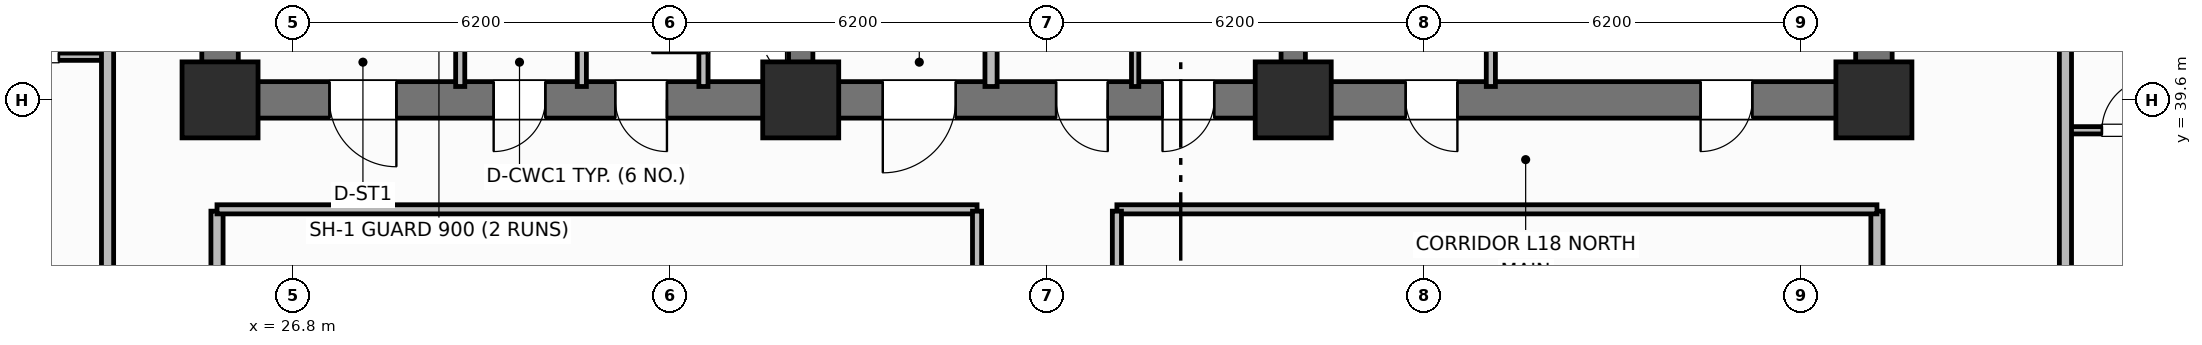
"""IFC4 building model, lengths in metres.
Left out: names, types, materials, properties, quantities, classifications, styles, units other than length and angle.
Written with IfcOpenShell. Run it as: python <this file> out.ifc"""

import sys

from ifc_helpers import new_model, si_unit, direction, frame, frame_2d, origin, origin_2d, place, context, subcontext, project, spatial, rectangle, extrude, element, fill, save


model = new_model("IFC4")
c1 = context("Model", 3, precision=1e-05, world=origin(), true_north=direction((0.0, 1.0)))
c2 = subcontext(c1, "Body", "Model", "MODEL_VIEW")
j1 = project(units=[si_unit("LENGTHUNIT", "METRE"), si_unit("PLANEANGLEUNIT", "RADIAN")], contexts=[c1])
p1 = place(None, origin())
s1 = spatial("IfcSite", under=j1, at=p1, CompositionType="ELEMENT")
p2 = place(p1, origin())
s2 = spatial("IfcBuilding", under=s1, at=p2, CompositionType="ELEMENT")
p3 = place(p2, frame((0.0, 0.0, 73.2)))
s3 = spatial("IfcBuildingStorey", under=s2, at=p3, CompositionType="ELEMENT", Elevation=73.2)
for number, where, z_axis, x_axis in (
    (1, (25.6, 39.9, 0.0), (0.0, 0.0, 1.0), (0.0, 1.0, 0.0)),
    (2, (52.8, 39.9, 0.0), (0.0, 0.0, 1.0), (0.0, 1.0, 0.0)),
):
    element("IfcWall", number, at=place(p3, frame(where, z_axis=z_axis, x_axis=x_axis)), inside=s3, PredefinedType="SHEAR", context=c2, shape_type="SweptSolid", body=[
        extrude(rectangle(XDim=5.6, YDim=0.6, at=frame_2d((2.8, 0.0))), origin(), (0.0, 0.0, 1.0), 3.7),
    ])
p4 = place(p3, frame((52.8, 39.6, 0.0), z_axis=(0.0, 0.0, 1.0), x_axis=(-1.0, 0.0, 0.0)))
e3 = element("IfcWall", 3, at=p4, inside=s3, PredefinedType="SHEAR", context=c2, shape_type="SweptSolid", body=[
    extrude(rectangle(XDim=27.2, YDim=0.6, at=frame_2d((13.6, 0.0))), origin(), (0.0, 0.0, 1.0), 3.7),
])
p5 = place(p4, frame((24.3, 0.0, 0.0)))
e4 = element("IfcOpeningElement", 4, at=p5, cuts=e3, PredefinedType="OPENING", context=c2, shape_type="SweptSolid", body=[
    extrude(rectangle(XDim=1.1, YDim=2.15, at=frame_2d((0.55, 1.075))), frame((0.0, 0.31, 0.0), z_axis=(0.0, -1.0, 0.0), x_axis=(1.0, 0.0, 0.0)), (0.0, 0.0, 1.0), 0.62),
])
p6 = place(p4, frame((21.85, 0.0, 0.0)))
e5 = element("IfcOpeningElement", 5, at=p6, cuts=e3, PredefinedType="OPENING", context=c2, shape_type="SweptSolid", body=[
    extrude(rectangle(XDim=0.85, YDim=2.1, at=frame_2d((0.425, 1.05))), frame((0.0, 0.31, 0.0), z_axis=(0.0, -1.0, 0.0), x_axis=(1.0, 0.0, 0.0)), (0.0, 0.0, 1.0), 0.62),
])
p7 = place(p4, frame((19.85, 0.0, 0.0)))
e6 = element("IfcOpeningElement", 6, at=p7, cuts=e3, PredefinedType="OPENING", context=c2, shape_type="SweptSolid", body=[
    extrude(rectangle(XDim=0.85, YDim=2.1, at=frame_2d((0.425, 1.05))), frame((0.0, 0.31, 0.0), z_axis=(0.0, -1.0, 0.0), x_axis=(1.0, 0.0, 0.0)), (0.0, 0.0, 1.0), 0.62),
])
p8 = place(p4, frame((15.1, 0.0, 0.0)))
e7 = element("IfcOpeningElement", 7, at=p8, cuts=e3, PredefinedType="OPENING", context=c2, shape_type="SweptSolid", body=[
    extrude(rectangle(XDim=1.2, YDim=2.15, at=frame_2d((0.6, 1.075))), frame((0.0, 0.31, 0.0), z_axis=(0.0, -1.0, 0.0), x_axis=(1.0, 0.0, 0.0)), (0.0, 0.0, 1.0), 0.62),
])
p9 = place(p4, frame((12.6, 0.0, 0.0)))
e8 = element("IfcOpeningElement", 8, at=p9, cuts=e3, PredefinedType="OPENING", context=c2, shape_type="SweptSolid", body=[
    extrude(rectangle(XDim=0.85, YDim=2.1, at=frame_2d((0.425, 1.05))), frame((0.0, 0.31, 0.0), z_axis=(0.0, -1.0, 0.0), x_axis=(1.0, 0.0, 0.0)), (0.0, 0.0, 1.0), 0.62),
])
p10 = place(p4, frame((10.85, 0.0, 0.0)))
e9 = element("IfcOpeningElement", 9, at=p10, cuts=e3, PredefinedType="OPENING", context=c2, shape_type="SweptSolid", body=[
    extrude(rectangle(XDim=0.85, YDim=2.1, at=frame_2d((0.425, 1.05))), frame((0.0, 0.31, 0.0), z_axis=(0.0, -1.0, 0.0), x_axis=(1.0, 0.0, 0.0)), (0.0, 0.0, 1.0), 0.62),
])
p11 = place(p4, frame((6.85, 0.0, 0.0)))
e10 = element("IfcOpeningElement", 10, at=p11, cuts=e3, PredefinedType="OPENING", context=c2, shape_type="SweptSolid", body=[
    extrude(rectangle(XDim=0.85, YDim=2.1, at=frame_2d((0.425, 1.05))), frame((0.0, 0.31, 0.0), z_axis=(0.0, -1.0, 0.0), x_axis=(1.0, 0.0, 0.0)), (0.0, 0.0, 1.0), 0.62),
])
p12 = place(p4, frame((2.0, 0.0, 0.0)))
e11 = element("IfcOpeningElement", 11, at=p12, cuts=e3, PredefinedType="OPENING", context=c2, shape_type="SweptSolid", body=[
    extrude(rectangle(XDim=0.85, YDim=2.1, at=frame_2d((0.425, 1.05))), frame((0.0, 0.31, 0.0), z_axis=(0.0, -1.0, 0.0), x_axis=(1.0, 0.0, 0.0)), (0.0, 0.0, 1.0), 0.62),
])
for number, where, z_axis, x_axis in (
    (12, (35.15, 39.9, 0.0), (0.0, 0.0, 1.0), (0.0, 1.0, 0.0)),
    (13, (43.25, 39.9, 0.0), (0.0, 0.0, 1.0), (0.0, 1.0, 0.0)),
):
    element("IfcWall", number, at=place(p3, frame(where, z_axis=z_axis, x_axis=x_axis)), inside=s3, PredefinedType="SHEAR", context=c2, shape_type="SweptSolid", body=[
        extrude(rectangle(XDim=5.6, YDim=0.4, at=frame_2d((2.8, 0.0))), origin(), (0.0, 0.0, 1.0), 3.7),
    ])
for number, where, z_axis, x_axis in (
    (14, (25.6, 39.6, 0.0), (0.0, 0.0, 1.0), (1.0, 0.0, 0.0)),
    (15, (35.15, 39.6, 0.0), (0.0, 0.0, 1.0), (1.0, 0.0, 0.0)),
    (16, (43.25, 39.6, 0.0), (0.0, 0.0, 1.0), (1.0, 0.0, 0.0)),
    (17, (52.8, 39.6, 0.0), (0.0, 0.0, 1.0), (1.0, 0.0, 0.0)),
):
    element("IfcColumn", number, at=place(p3, frame(where, z_axis=z_axis, x_axis=x_axis)), inside=s3, PredefinedType="COLUMN", context=c2, shape_type="SweptSolid", body=[
        extrude(rectangle(XDim=1.25, YDim=1.25, at=origin_2d()), origin(), (0.0, 0.0, 1.0), 3.7),
    ])
p13 = place(p3, frame((33.55, 39.82, 0.0), z_axis=(0.0, 0.0, 1.0), x_axis=(0.0, 1.0, 0.0)))
e18 = element("IfcWall", 18, at=p13, inside=s3, PredefinedType="PARTITIONING", context=c2, shape_type="SweptSolid", body=[
    extrude(rectangle(XDim=2.13, YDim=0.15, at=frame_2d((1.065, 0.0))), origin(), (0.0, 0.0, 1.0), 2.49),
])
p14 = place(p13, frame((0.55, 0.0, 0.0)))
e19 = element("IfcOpeningElement", 19, at=p14, cuts=e18, PredefinedType="OPENING", context=c2, shape_type="SweptSolid", body=[
    extrude(rectangle(XDim=0.85, YDim=2.05, at=frame_2d((0.425, 1.025))), frame((0.0, 0.085, 0.0), z_axis=(0.0, -1.0, 0.0), x_axis=(1.0, 0.0, 0.0)), (0.0, 0.0, 1.0), 0.17),
])
for number, where, z_axis, x_axis in (
    (20, (29.55, 39.82, 0.0), (0.0, 0.0, 1.0), (0.0, 1.0, 0.0)),
    (21, (31.55, 39.82, 0.0), (0.0, 0.0, 1.0), (0.0, 1.0, 0.0)),
):
    element("IfcWall", number, at=place(p3, frame(where, z_axis=z_axis, x_axis=x_axis)), inside=s3, PredefinedType="PARTITIONING", context=c2, shape_type="SweptSolid", body=[
        extrude(rectangle(XDim=2.13, YDim=0.15, at=frame_2d((1.065, 0.0))), origin(), (0.0, 0.0, 1.0), 2.49),
    ])
p15 = place(p3, frame((38.28, 39.82, 0.0), z_axis=(0.0, 0.0, 1.0), x_axis=(0.0, 1.0, 0.0)))
e22 = element("IfcWall", 22, at=p15, inside=s3, PredefinedType="PARTITIONING", context=c2, shape_type="SweptSolid", body=[
    extrude(rectangle(XDim=2.73, YDim=0.2, at=frame_2d((1.365, 0.0))), origin(), (0.0, 0.0, 1.0), 2.49),
])
p16 = place(p3, frame((40.65, 39.82, 0.0), z_axis=(0.0, 0.0, 1.0), x_axis=(0.0, 1.0, 0.0)))
e23 = element("IfcWall", 23, at=p16, inside=s3, PredefinedType="PARTITIONING", context=c2, shape_type="SweptSolid", body=[
    extrude(rectangle(XDim=2.73, YDim=0.12, at=frame_2d((1.365, 0.0))), origin(), (0.0, 0.0, 1.0), 2.49),
])
p17 = place(p3, frame((46.5, 39.82, 0.0), z_axis=(0.0, 0.0, 1.0), x_axis=(0.0, 1.0, 0.0)))
e24 = element("IfcWall", 24, at=p17, inside=s3, PredefinedType="PARTITIONING", context=c2, shape_type="SweptSolid", body=[
    extrude(rectangle(XDim=2.73, YDim=0.15, at=frame_2d((1.365, 0.0))), origin(), (0.0, 0.0, 1.0), 2.49),
])
for number, where, z_axis, x_axis in (
    (25, (25.55, 18.63, 0.0), (0.0, 0.0, 1.0), (0.0, 1.0, 0.0)),
    (26, (52.85, 18.63, 0.0), (0.0, 0.0, 1.0), (0.0, 1.0, 0.0)),
):
    element("IfcWall", number, at=place(p3, frame(where, z_axis=z_axis, x_axis=x_axis)), inside=s3, PredefinedType="PARTITIONING", context=c2, shape_type="SweptSolid", body=[
        extrude(rectangle(XDim=19.14, YDim=0.2, at=frame_2d((9.57, 0.0))), origin(), (0.0, 0.0, 1.0), 2.49),
    ])
for number, where, z_axis, x_axis in (
    (27, (25.55, 37.8, 0.0), (0.0, 0.0, 1.0), (1.0, 0.0, 0.0)),
    (28, (40.35, 37.8, 0.0), (0.0, 0.0, 1.0), (1.0, 0.0, 0.0)),
):
    element("IfcWall", number, at=place(p3, frame(where, z_axis=z_axis, x_axis=x_axis)), inside=s3, PredefinedType="PARTITIONING", context=c2, shape_type="SweptSolid", body=[
        extrude(rectangle(XDim=12.5, YDim=0.15, at=frame_2d((6.25, 0.0))), origin(), (0.0, 0.0, 1.0), 2.49),
    ])
p18 = place(p3, frame((38.05, 18.63, 0.0), z_axis=(0.0, 0.0, 1.0), x_axis=(0.0, 1.0, 0.0)))
e29 = element("IfcWall", 29, at=p18, inside=s3, PredefinedType="PARTITIONING", context=c2, shape_type="SweptSolid", body=[
    extrude(rectangle(XDim=19.14, YDim=0.15, at=frame_2d((9.57, 0.0))), origin(), (0.0, 0.0, 1.0), 2.49),
])
p19 = place(p18, frame((2.2, 0.0, 0.0)))
e30 = element("IfcOpeningElement", 30, at=p19, cuts=e29, PredefinedType="OPENING", context=c2, shape_type="SweptSolid", body=[
    extrude(rectangle(XDim=1.0, YDim=2.15, at=frame_2d((0.5, 1.075))), frame((0.0, 0.085, 0.0), z_axis=(0.0, -1.0, 0.0), x_axis=(1.0, 0.0, 0.0)), (0.0, 0.0, 1.0), 0.17),
])
p20 = place(p18, frame((12.518, 0.0, 0.0)))
e31 = element("IfcOpeningElement", 31, at=p20, cuts=e29, PredefinedType="OPENING", context=c2, shape_type="SweptSolid", body=[
    extrude(rectangle(XDim=1.0, YDim=2.15, at=frame_2d((0.5, 1.075))), frame((0.0, 0.085, 0.0), z_axis=(0.0, -1.0, 0.0), x_axis=(1.0, 0.0, 0.0)), (0.0, 0.0, 1.0), 0.17),
])
p21 = place(p3, frame((40.35, 18.63, 0.0), z_axis=(0.0, 0.0, 1.0), x_axis=(0.0, 1.0, 0.0)))
e32 = element("IfcWall", 32, at=p21, inside=s3, PredefinedType="PARTITIONING", context=c2, shape_type="SweptSolid", body=[
    extrude(rectangle(XDim=19.14, YDim=0.15, at=frame_2d((9.57, 0.0))), origin(), (0.0, 0.0, 1.0), 2.49),
])
p22 = place(p21, frame((2.2, 0.0, 0.0)))
e33 = element("IfcOpeningElement", 33, at=p22, cuts=e32, PredefinedType="OPENING", context=c2, shape_type="SweptSolid", body=[
    extrude(rectangle(XDim=1.0, YDim=2.15, at=frame_2d((0.5, 1.075))), frame((0.0, 0.085, 0.0), z_axis=(0.0, -1.0, 0.0), x_axis=(1.0, 0.0, 0.0)), (0.0, 0.0, 1.0), 0.17),
])
p23 = place(p21, frame((12.518, 0.0, 0.0)))
e34 = element("IfcOpeningElement", 34, at=p23, cuts=e32, PredefinedType="OPENING", context=c2, shape_type="SweptSolid", body=[
    extrude(rectangle(XDim=0.9, YDim=2.1, at=frame_2d((0.45, 1.05))), frame((0.0, 0.085, 0.0), z_axis=(0.0, -1.0, 0.0), x_axis=(1.0, 0.0, 0.0)), (0.0, 0.0, 1.0), 0.17),
])
p24 = place(p3, frame((21.5, 40.31, 0.0), z_axis=(0.0, 0.0, 1.0), x_axis=(1.0, 0.0, 0.0)))
e35 = element("IfcWall", 35, at=p24, inside=s3, PredefinedType="PARTITIONING", context=c2, shape_type="SweptSolid", body=[
    extrude(rectangle(XDim=2.25, YDim=0.12, at=frame_2d((1.125, 0.0))), origin(), (0.0, 0.0, 1.0), 2.49),
])
p25 = place(p24, frame((0.6, 0.0, 0.0)))
e36 = element("IfcOpeningElement", 36, at=p25, cuts=e35, PredefinedType="OPENING", context=c2, shape_type="SweptSolid", body=[
    extrude(rectangle(XDim=0.85, YDim=2.1, at=frame_2d((0.425, 1.05))), frame((0.0, 0.07, 0.0), z_axis=(0.0, -1.0, 0.0), x_axis=(1.0, 0.0, 0.0)), (0.0, 0.0, 1.0), 0.14),
])
p26 = place(p3, frame((23.75, 10.6, 0.0), z_axis=(0.0, 0.0, 1.0), x_axis=(0.0, 1.0, 0.0)))
e37 = element("IfcWall", 37, at=p26, inside=s3, PredefinedType="PARTITIONING", context=c2, shape_type="SweptSolid", body=[
    extrude(rectangle(XDim=35.2, YDim=0.2, at=frame_2d((17.6, 0.0))), origin(), (0.0, 0.0, 1.0), 2.49),
])
p27 = place(p26, frame((2.65, 0.0, 0.0)))
e38 = element("IfcOpeningElement", 38, at=p27, cuts=e37, PredefinedType="OPENING", context=c2, shape_type="SweptSolid", body=[
    extrude(rectangle(XDim=1.0, YDim=2.15, at=frame_2d((0.5, 1.075))), frame((0.0, 0.11, 0.0), z_axis=(0.0, -1.0, 0.0), x_axis=(1.0, 0.0, 0.0)), (0.0, 0.0, 1.0), 0.22),
])
p28 = place(p26, frame((13.222, 0.0, 0.0)))
e39 = element("IfcOpeningElement", 39, at=p28, cuts=e37, PredefinedType="OPENING", context=c2, shape_type="SweptSolid", body=[
    extrude(rectangle(XDim=1.0, YDim=2.15, at=frame_2d((0.5, 1.075))), frame((0.0, 0.11, 0.0), z_axis=(0.0, -1.0, 0.0), x_axis=(1.0, 0.0, 0.0)), (0.0, 0.0, 1.0), 0.22),
])
p29 = place(p26, frame((25.19, 0.0, 0.0)))
e40 = element("IfcOpeningElement", 40, at=p29, cuts=e37, PredefinedType="OPENING", context=c2, shape_type="SweptSolid", body=[
    extrude(rectangle(XDim=1.0, YDim=2.15, at=frame_2d((0.5, 1.075))), frame((0.0, 0.11, 0.0), z_axis=(0.0, -1.0, 0.0), x_axis=(1.0, 0.0, 0.0)), (0.0, 0.0, 1.0), 0.22),
])
p30 = place(p3, frame((55.95, 39.1, 0.0), z_axis=(0.0, 0.0, 1.0), x_axis=(1.0, 0.0, 0.0)))
e41 = element("IfcWall", 41, at=p30, inside=s3, PredefinedType="PARTITIONING", context=c2, shape_type="SweptSolid", body=[
    extrude(rectangle(XDim=2.25, YDim=0.12, at=frame_2d((1.125, 0.0))), origin(), (0.0, 0.0, 1.0), 2.49),
])
p31 = place(p30, frame((0.6, 0.0, 0.0)))
e42 = element("IfcOpeningElement", 42, at=p31, cuts=e41, PredefinedType="OPENING", context=c2, shape_type="SweptSolid", body=[
    extrude(rectangle(XDim=0.85, YDim=2.1, at=frame_2d((0.425, 1.05))), frame((0.0, 0.07, 0.0), z_axis=(0.0, -1.0, 0.0), x_axis=(1.0, 0.0, 0.0)), (0.0, 0.0, 1.0), 0.14),
])
p32 = place(p3, frame((55.95, 10.6, 0.0), z_axis=(0.0, 0.0, 1.0), x_axis=(0.0, 1.0, 0.0)))
e43 = element("IfcWall", 43, at=p32, inside=s3, PredefinedType="PARTITIONING", context=c2, shape_type="SweptSolid", body=[
    extrude(rectangle(XDim=35.2, YDim=0.2, at=frame_2d((17.6, 0.0))), origin(), (0.0, 0.0, 1.0), 2.49),
])
p33 = place(p32, frame((2.65, 0.0, 0.0)))
e44 = element("IfcOpeningElement", 44, at=p33, cuts=e43, PredefinedType="OPENING", context=c2, shape_type="SweptSolid", body=[
    extrude(rectangle(XDim=1.0, YDim=2.15, at=frame_2d((0.5, 1.075))), frame((0.0, 0.11, 0.0), z_axis=(0.0, -1.0, 0.0), x_axis=(1.0, 0.0, 0.0)), (0.0, 0.0, 1.0), 0.22),
])
p34 = place(p32, frame((12.87, 0.0, 0.0)))
e45 = element("IfcOpeningElement", 45, at=p34, cuts=e43, PredefinedType="OPENING", context=c2, shape_type="SweptSolid", body=[
    extrude(rectangle(XDim=1.0, YDim=2.15, at=frame_2d((0.5, 1.075))), frame((0.0, 0.11, 0.0), z_axis=(0.0, -1.0, 0.0), x_axis=(1.0, 0.0, 0.0)), (0.0, 0.0, 1.0), 0.22),
])
p35 = place(p32, frame((23.65, 0.0, 0.0)))
e46 = element("IfcOpeningElement", 46, at=p35, cuts=e43, PredefinedType="OPENING", context=c2, shape_type="SweptSolid", body=[
    extrude(rectangle(XDim=1.0, YDim=2.15, at=frame_2d((0.5, 1.075))), frame((0.0, 0.11, 0.0), z_axis=(0.0, -1.0, 0.0), x_axis=(1.0, 0.0, 0.0)), (0.0, 0.0, 1.0), 0.22),
])
p36 = place(p14, origin())
e47 = element("IfcDoor", 47, at=p36, inside=s3, OperationType="SINGLE_SWING_LEFT", PredefinedType="TRAPDOOR", context=c2, shape_type="SweptSolid", body=[
    extrude(rectangle(XDim=0.85, YDim=2.05, at=frame_2d((0.425, 1.025))), frame((0.0, 0.025, 0.0), z_axis=(0.0, -1.0, 0.0), x_axis=(1.0, 0.0, 0.0)), (0.0, 0.0, 1.0), 0.05),
])
fill(e19, e47)
p37 = place(p25, origin())
e48 = element("IfcDoor", 48, at=p37, inside=s3, OperationType="SINGLE_SWING_LEFT", PredefinedType="DOOR", context=c2, shape_type="SweptSolid", body=[
    extrude(rectangle(XDim=0.85, YDim=2.1, at=frame_2d((0.425, 1.05))), frame((0.0, 0.025, 0.0), z_axis=(0.0, -1.0, 0.0), x_axis=(1.0, 0.0, 0.0)), (0.0, 0.0, 1.0), 0.05),
])
fill(e36, e48)
p38 = place(p31, origin())
e49 = element("IfcDoor", 49, at=p38, inside=s3, OperationType="SINGLE_SWING_RIGHT", PredefinedType="DOOR", context=c2, shape_type="SweptSolid", body=[
    extrude(rectangle(XDim=0.85, YDim=2.1, at=frame_2d((0.425, 1.05))), frame((0.0, 0.025, 0.0), z_axis=(0.0, -1.0, 0.0), x_axis=(1.0, 0.0, 0.0)), (0.0, 0.0, 1.0), 0.05),
])
fill(e42, e49)
p39 = place(p5, origin())
e50 = element("IfcDoor", 50, at=p39, inside=s3, OperationType="SINGLE_SWING_LEFT", PredefinedType="DOOR", context=c2, shape_type="SweptSolid", body=[
    extrude(rectangle(XDim=1.1, YDim=2.15, at=frame_2d((0.55, 1.075))), frame((0.0, 0.025, 0.0), z_axis=(0.0, -1.0, 0.0), x_axis=(1.0, 0.0, 0.0)), (0.0, 0.0, 1.0), 0.05),
])
fill(e4, e50)
p40 = place(p6, origin())
e51 = element("IfcDoor", 51, at=p40, inside=s3, OperationType="SINGLE_SWING_RIGHT", PredefinedType="DOOR", context=c2, shape_type="SweptSolid", body=[
    extrude(rectangle(XDim=0.85, YDim=2.1, at=frame_2d((0.425, 1.05))), frame((0.0, 0.025, 0.0), z_axis=(0.0, -1.0, 0.0), x_axis=(1.0, 0.0, 0.0)), (0.0, 0.0, 1.0), 0.05),
])
fill(e5, e51)
p41 = place(p7, origin())
e52 = element("IfcDoor", 52, at=p41, inside=s3, OperationType="SINGLE_SWING_LEFT", PredefinedType="DOOR", context=c2, shape_type="SweptSolid", body=[
    extrude(rectangle(XDim=0.85, YDim=2.1, at=frame_2d((0.425, 1.05))), frame((0.0, 0.025, 0.0), z_axis=(0.0, -1.0, 0.0), x_axis=(1.0, 0.0, 0.0)), (0.0, 0.0, 1.0), 0.05),
])
fill(e6, e52)
p42 = place(p8, origin())
e53 = element("IfcDoor", 53, at=p42, inside=s3, OperationType="SINGLE_SWING_RIGHT", PredefinedType="DOOR", context=c2, shape_type="SweptSolid", body=[
    extrude(rectangle(XDim=1.2, YDim=2.15, at=frame_2d((0.6, 1.075))), frame((0.0, 0.025, 0.0), z_axis=(0.0, -1.0, 0.0), x_axis=(1.0, 0.0, 0.0)), (0.0, 0.0, 1.0), 0.05),
])
fill(e7, e53)
p43 = place(p9, origin())
e54 = element("IfcDoor", 54, at=p43, inside=s3, OperationType="SINGLE_SWING_LEFT", PredefinedType="DOOR", context=c2, shape_type="SweptSolid", body=[
    extrude(rectangle(XDim=0.85, YDim=2.1, at=frame_2d((0.425, 1.05))), frame((0.0, 0.025, 0.0), z_axis=(0.0, -1.0, 0.0), x_axis=(1.0, 0.0, 0.0)), (0.0, 0.0, 1.0), 0.05),
])
fill(e8, e54)
p44 = place(p10, origin())
e55 = element("IfcDoor", 55, at=p44, inside=s3, OperationType="SINGLE_SWING_RIGHT", PredefinedType="DOOR", context=c2, shape_type="SweptSolid", body=[
    extrude(rectangle(XDim=0.85, YDim=2.1, at=frame_2d((0.425, 1.05))), frame((0.0, 0.025, 0.0), z_axis=(0.0, -1.0, 0.0), x_axis=(1.0, 0.0, 0.0)), (0.0, 0.0, 1.0), 0.05),
])
fill(e9, e55)
p45 = place(p11, origin())
e56 = element("IfcDoor", 56, at=p45, inside=s3, OperationType="SINGLE_SWING_LEFT", PredefinedType="DOOR", context=c2, shape_type="SweptSolid", body=[
    extrude(rectangle(XDim=0.85, YDim=2.1, at=frame_2d((0.425, 1.05))), frame((0.0, 0.025, 0.0), z_axis=(0.0, -1.0, 0.0), x_axis=(1.0, 0.0, 0.0)), (0.0, 0.0, 1.0), 0.05),
])
fill(e10, e56)
p46 = place(p12, origin())
e57 = element("IfcDoor", 57, at=p46, inside=s3, OperationType="SINGLE_SWING_RIGHT", PredefinedType="DOOR", context=c2, shape_type="SweptSolid", body=[
    extrude(rectangle(XDim=0.85, YDim=2.1, at=frame_2d((0.425, 1.05))), frame((0.0, 0.025, 0.0), z_axis=(0.0, -1.0, 0.0), x_axis=(1.0, 0.0, 0.0)), (0.0, 0.0, 1.0), 0.05),
])
fill(e11, e57)
save(model, sys.argv[1])
